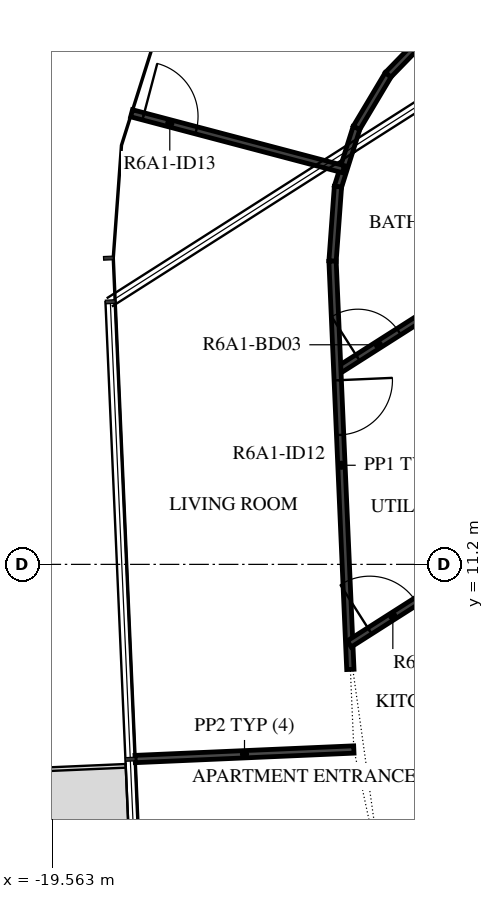
"""IFC4 building model, lengths in metres.
Left out: names, types, materials, properties, quantities, classifications, styles, units other than length and angle.
Written with IfcOpenShell. Run it as: python <this file> out.ifc"""

import sys

from ifc_helpers import new_model, si_unit, direction, frame, frame_2d, origin, place, context, subcontext, project, spatial, rectangle, extrude, element, fill, save


model = new_model("IFC4")
c1 = context("Model", 3, precision=1e-05, world=origin(), true_north=direction((0.0, 1.0)))
c2 = subcontext(c1, "Body", "Model", "MODEL_VIEW")
j1 = project(units=[si_unit("LENGTHUNIT", "METRE"), si_unit("PLANEANGLEUNIT", "RADIAN")], contexts=[c1])
p1 = place(None, origin())
s1 = spatial("IfcSite", under=j1, at=p1, CompositionType="ELEMENT")
p2 = place(p1, origin())
s2 = spatial("IfcBuilding", under=s1, at=p2, CompositionType="ELEMENT")
p3 = place(p2, frame((0.0, 0.0, 230.2)))
s3 = spatial("IfcBuildingStorey", under=s2, at=p3, CompositionType="ELEMENT", Elevation=230.2)
p4 = place(p3, frame((-10.228, 9.372, 0.0), z_axis=(0.0, 0.0, 1.0), x_axis=(-0.461759464021, -0.887005184532, 0.0)))
e1 = element("IfcWall", 1, at=p4, inside=s3, PredefinedType="STANDARD", context=c2, shape_type="SweptSolid", body=[
    extrude(rectangle(XDim=7.181, YDim=0.2, at=frame_2d((3.591, 0.0))), origin(), (0.0, 0.0, 1.0), 3.12),
])
p5 = place(p4, frame((0.2, 0.0, 0.0)))
e2 = element("IfcOpeningElement", 2, at=p5, cuts=e1, PredefinedType="OPENING", context=c2, shape_type="SweptSolid", body=[
    extrude(rectangle(XDim=1.0, YDim=2.1, at=frame_2d((0.5, 1.05))), frame((0.0, 0.11, 0.0), z_axis=(0.0, -1.0, 0.0), x_axis=(1.0, 0.0, 0.0)), (0.0, 0.0, 1.0), 0.22),
])
p6 = place(p3, frame((-14.837, 23.29, 0.0), z_axis=(0.0, 0.0, 1.0), x_axis=(0.537316863221, -0.843380452998, 0.0)))
e3 = element("IfcWall", 3, at=p6, inside=s3, PredefinedType="STANDARD", context=c2, shape_type="SweptSolid", body=[
    extrude(rectangle(XDim=6.227, YDim=0.2, at=frame_2d((3.113, 0.0))), origin(), (0.0, 0.0, 1.0), 3.12),
])
p7 = place(p3, frame((-11.373, 10.421, 0.0), z_axis=(0.0, 0.0, 1.0), x_axis=(-0.522435957358, -0.852678527031, 0.0)))
e4 = element("IfcWall", 4, at=p7, inside=s3, PredefinedType="PARTITIONING", context=c2, shape_type="SweptSolid", body=[
    extrude(rectangle(XDim=5.267, YDim=0.12, at=frame_2d((2.633, 0.0))), origin(), (0.0, 0.0, 1.0), 3.12),
])
for number, where, z_axis, x_axis in (
    (5, (-14.865, 17.411, 0.0), (0.0, 0.0, 1.0), (0.301, 0.954, 0.0)),
    (6, (-14.56, 18.38, 0.0), (0.0, 0.0, 1.0), (0.513, 0.859, 0.0)),
    (7, (-14.039, 19.252, 0.0), (0.0, 0.0, 1.0), (0.697, 0.717, 0.0)),
):
    element("IfcWall", number, at=place(p3, frame(where, z_axis=z_axis, x_axis=x_axis)), inside=s3, PredefinedType="PARTITIONING", context=c2, shape_type="SweptSolid", body=[
        extrude(rectangle(XDim=1.016, YDim=0.12, at=frame_2d((0.508, 0.0))), origin(), (0.0, 0.0, 1.0), 3.12),
    ])
p8 = place(p3, frame((-18.26, 18.618, 0.0), z_axis=(0.0, 0.0, 1.0), x_axis=(0.96689176932, -0.25518680691, 0.0)))
e8 = element("IfcWall", 8, at=p8, inside=s3, PredefinedType="PARTITIONING", context=c2, shape_type="SweptSolid", body=[
    extrude(rectangle(XDim=3.604, YDim=0.12, at=frame_2d((1.802, 0.0))), origin(), (0.0, 0.0, 1.0), 3.12),
])
p9 = place(p8, frame((0.2, 0.0, 0.0)))
e9 = element("IfcOpeningElement", 9, at=p9, cuts=e8, PredefinedType="OPENING", context=c2, shape_type="SweptSolid", body=[
    extrude(rectangle(XDim=0.9, YDim=2.1, at=frame_2d((0.45, 1.05))), frame((0.0, 0.07, 0.0), z_axis=(0.0, -1.0, 0.0), x_axis=(1.0, 0.0, 0.0)), (0.0, 0.0, 1.0), 0.14),
])
p10 = place(p3, frame((-14.876, 14.382, 0.0), z_axis=(0.0, 0.0, 1.0), x_axis=(0.843409222082, 0.537271704175, 0.0)))
e10 = element("IfcWall", 10, at=p10, inside=s3, PredefinedType="PARTITIONING", context=c2, shape_type="SweptSolid", body=[
    extrude(rectangle(XDim=3.388, YDim=0.12, at=frame_2d((1.694, 0.0))), origin(), (0.0, 0.0, 1.0), 3.12),
])
p11 = place(p10, frame((0.4, 0.0, 0.0)))
e11 = element("IfcOpeningElement", 11, at=p11, cuts=e10, PredefinedType="OPENING", context=c2, shape_type="SweptSolid", body=[
    extrude(rectangle(XDim=0.8, YDim=2.1, at=frame_2d((0.4, 1.05))), frame((0.0, 0.07, 0.0), z_axis=(0.0, -1.0, 0.0), x_axis=(1.0, 0.0, 0.0)), (0.0, 0.0, 1.0), 0.14),
])
p12 = place(p3, frame((-14.865, 17.411, 0.0), z_axis=(0.0, 0.0, 1.0), x_axis=(-0.072618457011, -0.997359794508, 0.0)))
e12 = element("IfcWall", 12, at=p12, inside=s3, PredefinedType="PARTITIONING", context=c2, shape_type="SweptSolid", body=[
    extrude(rectangle(XDim=1.227, YDim=0.12, at=frame_2d((0.614, 0.0))), origin(), (0.0, 0.0, 1.0), 3.12),
])
p13 = place(p3, frame((-14.955, 16.187, 0.0), z_axis=(0.0, 0.0, 1.0), x_axis=(0.043591713888, -0.999049429448, 0.0)))
e13 = element("IfcWall", 13, at=p13, inside=s3, PredefinedType="PARTITIONING", context=c2, shape_type="SweptSolid", body=[
    extrude(rectangle(XDim=6.721, YDim=0.12, at=frame_2d((3.36, 0.0))), origin(), (0.0, 0.0, 1.0), 3.12),
])
p14 = place(p13, frame((1.961, 0.0, 0.0)))
e14 = element("IfcOpeningElement", 14, at=p14, cuts=e13, PredefinedType="OPENING", context=c2, shape_type="SweptSolid", body=[
    extrude(rectangle(XDim=0.9, YDim=2.1, at=frame_2d((0.45, 1.05))), frame((0.0, 0.07, 0.0), z_axis=(0.0, -1.0, 0.0), x_axis=(1.0, 0.0, 0.0)), (0.0, 0.0, 1.0), 0.14),
])
p15 = place(p3, frame((-14.68, 9.891, 0.0), z_axis=(0.0, 0.0, 1.0), x_axis=(0.843391697183, 0.537299213774, 0.0)))
e15 = element("IfcWall", 15, at=p15, inside=s3, PredefinedType="PARTITIONING", context=c2, shape_type="SweptSolid", body=[
    extrude(rectangle(XDim=7.045, YDim=0.12, at=frame_2d((3.522, 0.0))), origin(), (0.0, 0.0, 1.0), 3.12),
])
p16 = place(p15, frame((0.4, 0.0, 0.0)))
e16 = element("IfcOpeningElement", 16, at=p16, cuts=e15, PredefinedType="OPENING", context=c2, shape_type="SweptSolid", body=[
    extrude(rectangle(XDim=0.9, YDim=2.1, at=frame_2d((0.45, 1.05))), frame((0.0, 0.07, 0.0), z_axis=(0.0, -1.0, 0.0), x_axis=(1.0, 0.0, 0.0)), (0.0, 0.0, 1.0), 0.14),
])
p17 = place(p3, frame((-18.201, 7.999, 0.0), z_axis=(0.0, 0.0, 1.0), x_axis=(0.999048850974, 0.043604969534, 0.0)))
e17 = element("IfcWall", 17, at=p17, inside=s3, PredefinedType="PARTITIONING", context=c2, shape_type="SweptSolid", body=[
    extrude(rectangle(XDim=3.6, YDim=0.12, at=frame_2d((1.8, 0.0))), origin(), (0.0, 0.0, 1.0), 2.73),
])
p18 = place(p16, origin())
e18 = element("IfcDoor", 18, at=p18, inside=s3, OperationType="SINGLE_SWING_LEFT", PredefinedType="DOOR", context=c2, shape_type="SweptSolid", body=[
    extrude(rectangle(XDim=0.9, YDim=2.1, at=frame_2d((0.45, 1.05))), frame((0.0, 0.025, 0.0), z_axis=(0.0, -1.0, 0.0), x_axis=(1.0, 0.0, 0.0)), (0.0, 0.0, 1.0), 0.05),
])
fill(e16, e18)
p19 = place(p11, origin())
e19 = element("IfcDoor", 19, at=p19, inside=s3, OperationType="SINGLE_SWING_LEFT", PredefinedType="DOOR", context=c2, shape_type="SweptSolid", body=[
    extrude(rectangle(XDim=0.8, YDim=2.1, at=frame_2d((0.4, 1.05))), frame((0.0, 0.025, 0.0), z_axis=(0.0, -1.0, 0.0), x_axis=(1.0, 0.0, 0.0)), (0.0, 0.0, 1.0), 0.05),
])
fill(e11, e19)
p20 = place(p14, origin())
e20 = element("IfcDoor", 20, at=p20, inside=s3, OperationType="SINGLE_SWING_LEFT", PredefinedType="DOOR", context=c2, shape_type="SweptSolid", body=[
    extrude(rectangle(XDim=0.9, YDim=2.1, at=frame_2d((0.45, 1.05))), frame((0.0, 0.025, 0.0), z_axis=(0.0, -1.0, 0.0), x_axis=(1.0, 0.0, 0.0)), (0.0, 0.0, 1.0), 0.05),
])
fill(e14, e20)
p21 = place(p9, origin())
e21 = element("IfcDoor", 21, at=p21, inside=s3, OperationType="SINGLE_SWING_LEFT", PredefinedType="DOOR", context=c2, shape_type="SweptSolid", body=[
    extrude(rectangle(XDim=0.9, YDim=2.1, at=frame_2d((0.45, 1.05))), frame((0.0, 0.025, 0.0), z_axis=(0.0, -1.0, 0.0), x_axis=(1.0, 0.0, 0.0)), (0.0, 0.0, 1.0), 0.05),
])
fill(e9, e21)
save(model, sys.argv[1])
